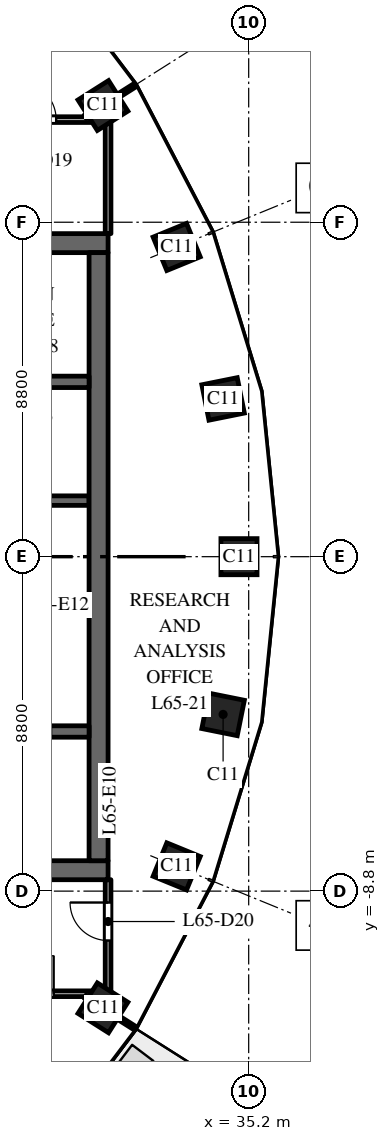
"""IFC4 building model, lengths in metres.
Left out: names, types, materials, properties, quantities, classifications, styles, units other than length and angle.
Written with IfcOpenShell. Run it as: python <this file> out.ifc"""

import sys

from ifc_helpers import new_model, si_unit, direction, frame, frame_2d, origin, origin_2d, place, context, subcontext, project, spatial, rectangle, extrude, element, fill, save


model = new_model("IFC4")
c1 = context("Model", 3, precision=1e-05, world=origin(), true_north=direction((0.0, 1.0)))
c2 = subcontext(c1, "Body", "Model", "MODEL_VIEW")
j1 = project(units=[si_unit("LENGTHUNIT", "METRE"), si_unit("PLANEANGLEUNIT", "RADIAN")], contexts=[c1])
p1 = place(None, origin())
s1 = spatial("IfcSite", under=j1, at=p1, CompositionType="ELEMENT")
p2 = place(p1, origin())
s2 = spatial("IfcBuilding", under=s1, at=p2, CompositionType="ELEMENT")
p3 = place(p2, frame((0.0, 0.0, 303.0)))
s3 = spatial("IfcBuildingStorey", under=s2, at=p3, CompositionType="ELEMENT", Elevation=303.0)
for number, where, z_axis, x_axis in (
    (1, (34.945, 0.0, 0.0), (0.0, 0.0, 1.0), (0.0, 1.0, 0.0)),
    (2, (34.527, 4.151, 0.0), (0.0, 0.0, 1.0), (-0.197, 0.98, 0.0)),
    (3, (33.305, 8.149, 0.0), (0.0, 0.0, 1.0), (-0.379, 0.925, 0.0)),
    (4, (31.365, 11.871, 0.0), (0.0, 0.0, 1.0), (-0.535, 0.845, 0.0)),
    (5, (31.365, -11.871, 0.0), (0.0, 0.0, 1.0), (0.535, 0.845, 0.0)),
    (6, (33.305, -8.149, 0.0), (0.0, 0.0, 1.0), (0.379, 0.925, 0.0)),
    (7, (34.527, -4.151, 0.0), (0.0, 0.0, 1.0), (0.197, 0.98, 0.0)),
):
    element("IfcColumn", number, at=place(p3, frame(where, z_axis=z_axis, x_axis=x_axis)), inside=s3, PredefinedType="COLUMN", context=c2, shape_type="SweptSolid", body=[
        extrude(rectangle(XDim=0.95, YDim=0.95, at=origin_2d()), origin(), (0.0, 0.0, 1.0), 4.0),
    ])
p4 = place(p3, frame((16.5, 8.25, 0.0), z_axis=(0.0, 0.0, 1.0), x_axis=(1.0, 0.0, 0.0)))
e8 = element("IfcWall", 8, at=p4, inside=s3, PredefinedType="SHEAR", context=c2, shape_type="SweptSolid", body=[
    extrude(rectangle(XDim=15.0, YDim=0.5, at=frame_2d((7.5, 0.0))), origin(), (0.0, 0.0, 1.0), 3.7),
])
p5 = place(p4, frame((6.9, 0.0, 0.0)))
e9 = element("IfcOpeningElement", 9, at=p5, cuts=e8, PredefinedType="OPENING", context=c2, shape_type="SweptSolid", body=[
    extrude(rectangle(XDim=1.2, YDim=2.1, at=frame_2d((0.6, 1.05))), frame((0.0, 0.26, 0.0), z_axis=(0.0, -1.0, 0.0), x_axis=(1.0, 0.0, 0.0)), (0.0, 0.0, 1.0), 0.52),
])
p6 = place(p4, frame((12.05, 0.0, 0.0)))
e10 = element("IfcOpeningElement", 10, at=p6, cuts=e8, PredefinedType="OPENING", context=c2, shape_type="SweptSolid", body=[
    extrude(rectangle(XDim=0.9, YDim=2.1, at=frame_2d((0.45, 1.05))), frame((0.0, 0.26, 0.0), z_axis=(0.0, -1.0, 0.0), x_axis=(1.0, 0.0, 0.0)), (0.0, 0.0, 1.0), 0.52),
])
p7 = place(p3, frame((16.5, -8.25, 0.0), z_axis=(0.0, 0.0, 1.0), x_axis=(1.0, 0.0, 0.0)))
e11 = element("IfcWall", 11, at=p7, inside=s3, PredefinedType="SHEAR", context=c2, shape_type="SweptSolid", body=[
    extrude(rectangle(XDim=15.0, YDim=0.5, at=frame_2d((7.5, 0.0))), origin(), (0.0, 0.0, 1.0), 3.7),
])
p8 = place(p7, frame((6.9, 0.0, 0.0)))
e12 = element("IfcOpeningElement", 12, at=p8, cuts=e11, PredefinedType="OPENING", context=c2, shape_type="SweptSolid", body=[
    extrude(rectangle(XDim=1.2, YDim=2.1, at=frame_2d((0.6, 1.05))), frame((0.0, 0.26, 0.0), z_axis=(0.0, -1.0, 0.0), x_axis=(1.0, 0.0, 0.0)), (0.0, 0.0, 1.0), 0.52),
])
p9 = place(p7, frame((12.425, 0.0, 0.0)))
e13 = element("IfcOpeningElement", 13, at=p9, cuts=e11, PredefinedType="OPENING", context=c2, shape_type="SweptSolid", body=[
    extrude(rectangle(XDim=0.9, YDim=2.1, at=frame_2d((0.45, 1.05))), frame((0.0, 0.26, 0.0), z_axis=(0.0, -1.0, 0.0), x_axis=(1.0, 0.0, 0.0)), (0.0, 0.0, 1.0), 0.52),
])
p10 = place(p3, frame((27.8, 1.475, 0.0), z_axis=(0.0, 0.0, 1.0), x_axis=(1.0, 0.0, 0.0)))
e14 = element("IfcWall", 14, at=p10, inside=s3, PredefinedType="SHEAR", context=c2, shape_type="SweptSolid", body=[
    extrude(rectangle(XDim=3.2, YDim=0.25, at=frame_2d((1.6, 0.0))), origin(), (0.0, 0.0, 1.0), 3.7),
])
p11 = place(p3, frame((31.25, -8.0, 0.0), z_axis=(0.0, 0.0, 1.0), x_axis=(0.0, 1.0, 0.0)))
e15 = element("IfcWall", 15, at=p11, inside=s3, PredefinedType="SHEAR", context=c2, shape_type="SweptSolid", body=[
    extrude(rectangle(XDim=16.0, YDim=0.5, at=frame_2d((8.0, 0.0))), origin(), (0.0, 0.0, 1.0), 3.7),
])
p12 = place(p3, frame((24.9, 4.6, 0.0), z_axis=(0.0, 0.0, 1.0), x_axis=(1.0, 0.0, 0.0)))
e16 = element("IfcWall", 16, at=p12, inside=s3, PredefinedType="SHEAR", context=c2, shape_type="SweptSolid", body=[
    extrude(rectangle(XDim=6.1, YDim=0.3, at=frame_2d((3.05, 0.0))), origin(), (0.0, 0.0, 1.0), 3.7),
])
p13 = place(p3, frame((24.9, -4.6, 0.0), z_axis=(0.0, 0.0, 1.0), x_axis=(1.0, 0.0, 0.0)))
e17 = element("IfcWall", 17, at=p13, inside=s3, PredefinedType="SHEAR", context=c2, shape_type="SweptSolid", body=[
    extrude(rectangle(XDim=6.1, YDim=0.3, at=frame_2d((3.05, 0.0))), origin(), (0.0, 0.0, 1.0), 3.7),
])
p14 = place(p13, frame((4.2, 0.0, 0.0)))
e18 = element("IfcOpeningElement", 18, at=p14, cuts=e17, PredefinedType="OPENING", context=c2, shape_type="SweptSolid", body=[
    extrude(rectangle(XDim=0.9, YDim=2.1, at=frame_2d((0.45, 1.05))), frame((0.0, 0.16, 0.0), z_axis=(0.0, -1.0, 0.0), x_axis=(1.0, 0.0, 0.0)), (0.0, 0.0, 1.0), 0.32),
])
p15 = place(p3, frame((-1.774, 11.5, 0.0), z_axis=(0.0, 0.0, 1.0), x_axis=(1.0, 0.0, 0.0)))
e19 = element("IfcWall", 19, at=p15, inside=s3, PredefinedType="PARTITIONING", context=c2, shape_type="SweptSolid", body=[
    extrude(rectangle(XDim=33.274, YDim=0.15, at=frame_2d((16.637, 0.0))), origin(), (0.0, 0.0, 1.0), 2.75),
])
p16 = place(p15, frame((1.532, 0.0, 0.0)))
e20 = element("IfcOpeningElement", 20, at=p16, cuts=e19, PredefinedType="OPENING", context=c2, shape_type="SweptSolid", body=[
    extrude(rectangle(XDim=1.0, YDim=2.1, at=frame_2d((0.5, 1.05))), frame((0.0, 0.085, 0.0), z_axis=(0.0, -1.0, 0.0), x_axis=(1.0, 0.0, 0.0)), (0.0, 0.0, 1.0), 0.17),
])
p17 = place(p15, frame((13.262, 0.0, 0.0)))
e21 = element("IfcOpeningElement", 21, at=p17, cuts=e19, PredefinedType="OPENING", context=c2, shape_type="SweptSolid", body=[
    extrude(rectangle(XDim=1.0, YDim=2.1, at=frame_2d((0.5, 1.05))), frame((0.0, 0.085, 0.0), z_axis=(0.0, -1.0, 0.0), x_axis=(1.0, 0.0, 0.0)), (0.0, 0.0, 1.0), 0.17),
])
p18 = place(p15, frame((22.548, 0.0, 0.0)))
e22 = element("IfcOpeningElement", 22, at=p18, cuts=e19, PredefinedType="OPENING", context=c2, shape_type="SweptSolid", body=[
    extrude(rectangle(XDim=1.0, YDim=2.1, at=frame_2d((0.5, 1.05))), frame((0.0, 0.085, 0.0), z_axis=(0.0, -1.0, 0.0), x_axis=(1.0, 0.0, 0.0)), (0.0, 0.0, 1.0), 0.17),
])
p19 = place(p15, frame((30.908, 0.0, 0.0)))
e23 = element("IfcOpeningElement", 23, at=p19, cuts=e19, PredefinedType="OPENING", context=c2, shape_type="SweptSolid", body=[
    extrude(rectangle(XDim=1.0, YDim=2.1, at=frame_2d((0.5, 1.05))), frame((0.0, 0.085, 0.0), z_axis=(0.0, -1.0, 0.0), x_axis=(1.0, 0.0, 0.0)), (0.0, 0.0, 1.0), 0.17),
])
p20 = place(p3, frame((1.485, -11.5, 0.0), z_axis=(0.0, 0.0, 1.0), x_axis=(1.0, 0.0, 0.0)))
e24 = element("IfcWall", 24, at=p20, inside=s3, PredefinedType="PARTITIONING", context=c2, shape_type="SweptSolid", body=[
    extrude(rectangle(XDim=30.015, YDim=0.15, at=frame_2d((15.007, 0.0))), origin(), (0.0, 0.0, 1.0), 2.75),
])
p21 = place(p20, frame((10.048, 0.0, 0.0)))
e25 = element("IfcOpeningElement", 25, at=p21, cuts=e24, PredefinedType="OPENING", context=c2, shape_type="SweptSolid", body=[
    extrude(rectangle(XDim=1.0, YDim=2.1, at=frame_2d((0.5, 1.05))), frame((0.0, 0.085, 0.0), z_axis=(0.0, -1.0, 0.0), x_axis=(1.0, 0.0, 0.0)), (0.0, 0.0, 1.0), 0.17),
])
p22 = place(p20, frame((19.294, 0.0, 0.0)))
e26 = element("IfcOpeningElement", 26, at=p22, cuts=e24, PredefinedType="OPENING", context=c2, shape_type="SweptSolid", body=[
    extrude(rectangle(XDim=1.0, YDim=2.1, at=frame_2d((0.5, 1.05))), frame((0.0, 0.085, 0.0), z_axis=(0.0, -1.0, 0.0), x_axis=(1.0, 0.0, 0.0)), (0.0, 0.0, 1.0), 0.17),
])
p23 = place(p20, frame((27.583, 0.0, 0.0)))
e27 = element("IfcOpeningElement", 27, at=p23, cuts=e24, PredefinedType="OPENING", context=c2, shape_type="SweptSolid", body=[
    extrude(rectangle(XDim=1.0, YDim=2.1, at=frame_2d((0.5, 1.05))), frame((0.0, 0.085, 0.0), z_axis=(0.0, -1.0, 0.0), x_axis=(1.0, 0.0, 0.0)), (0.0, 0.0, 1.0), 0.17),
])
for number, where, z_axis, x_axis in (
    (28, (30.897, -11.575, 0.0), (0.0, 0.0, 1.0), (0.845, -0.535, 0.0)),
    (29, (30.897, 11.575, 0.0), (0.0, 0.0, 1.0), (0.845, 0.535, 0.0)),
):
    element("IfcWall", number, at=place(p3, frame(where, z_axis=z_axis, x_axis=x_axis)), inside=s3, PredefinedType="PARTITIONING", context=c2, shape_type="SweptSolid", body=[
        extrude(rectangle(XDim=1.557, YDim=0.1, at=frame_2d((0.778, 0.0))), origin(), (0.0, 0.0, 1.0), 3.0),
    ])
p24 = place(p3, frame((31.5, -11.5, 0.0), z_axis=(0.0, 0.0, 1.0), x_axis=(0.0, 1.0, 0.0)))
e30 = element("IfcWall", 30, at=p24, inside=s3, PredefinedType="PARTITIONING", context=c2, shape_type="SweptSolid", body=[
    extrude(rectangle(XDim=3.0, YDim=0.15, at=frame_2d((1.5, 0.0))), origin(), (0.0, 0.0, 1.0), 3.0),
])
p25 = place(p24, frame((1.4, 0.0, 0.0)))
e31 = element("IfcOpeningElement", 31, at=p25, cuts=e30, PredefinedType="OPENING", context=c2, shape_type="SweptSolid", body=[
    extrude(rectangle(XDim=1.0, YDim=2.1, at=frame_2d((0.5, 1.05))), frame((0.0, 0.085, 0.0), z_axis=(0.0, -1.0, 0.0), x_axis=(1.0, 0.0, 0.0)), (0.0, 0.0, 1.0), 0.17),
])
p26 = place(p3, frame((31.5, 8.5, 0.0), z_axis=(0.0, 0.0, 1.0), x_axis=(0.0, 1.0, 0.0)))
e32 = element("IfcWall", 32, at=p26, inside=s3, PredefinedType="PARTITIONING", context=c2, shape_type="SweptSolid", body=[
    extrude(rectangle(XDim=3.0, YDim=0.15, at=frame_2d((1.5, 0.0))), origin(), (0.0, 0.0, 1.0), 3.0),
])
p27 = place(p23, origin())
e33 = element("IfcDoor", 33, at=p27, inside=s3, OperationType="SINGLE_SWING_RIGHT", PredefinedType="DOOR", context=c2, shape_type="SweptSolid", body=[
    extrude(rectangle(XDim=1.0, YDim=2.1, at=frame_2d((0.5, 1.05))), frame((0.0, 0.025, 0.0), z_axis=(0.0, -1.0, 0.0), x_axis=(1.0, 0.0, 0.0)), (0.0, 0.0, 1.0), 0.05),
])
fill(e27, e33)
p28 = place(p19, origin())
e34 = element("IfcDoor", 34, at=p28, inside=s3, OperationType="SINGLE_SWING_LEFT", PredefinedType="DOOR", context=c2, shape_type="SweptSolid", body=[
    extrude(rectangle(XDim=1.0, YDim=2.1, at=frame_2d((0.5, 1.05))), frame((0.0, 0.025, 0.0), z_axis=(0.0, -1.0, 0.0), x_axis=(1.0, 0.0, 0.0)), (0.0, 0.0, 1.0), 0.05),
])
fill(e23, e34)
p29 = place(p25, origin())
e35 = element("IfcDoor", 35, at=p29, inside=s3, OperationType="SINGLE_SWING_RIGHT", PredefinedType="DOOR", context=c2, shape_type="SweptSolid", body=[
    extrude(rectangle(XDim=1.0, YDim=2.1, at=frame_2d((0.5, 1.05))), frame((0.0, 0.025, 0.0), z_axis=(0.0, -1.0, 0.0), x_axis=(1.0, 0.0, 0.0)), (0.0, 0.0, 1.0), 0.05),
])
fill(e31, e35)
save(model, sys.argv[1])
